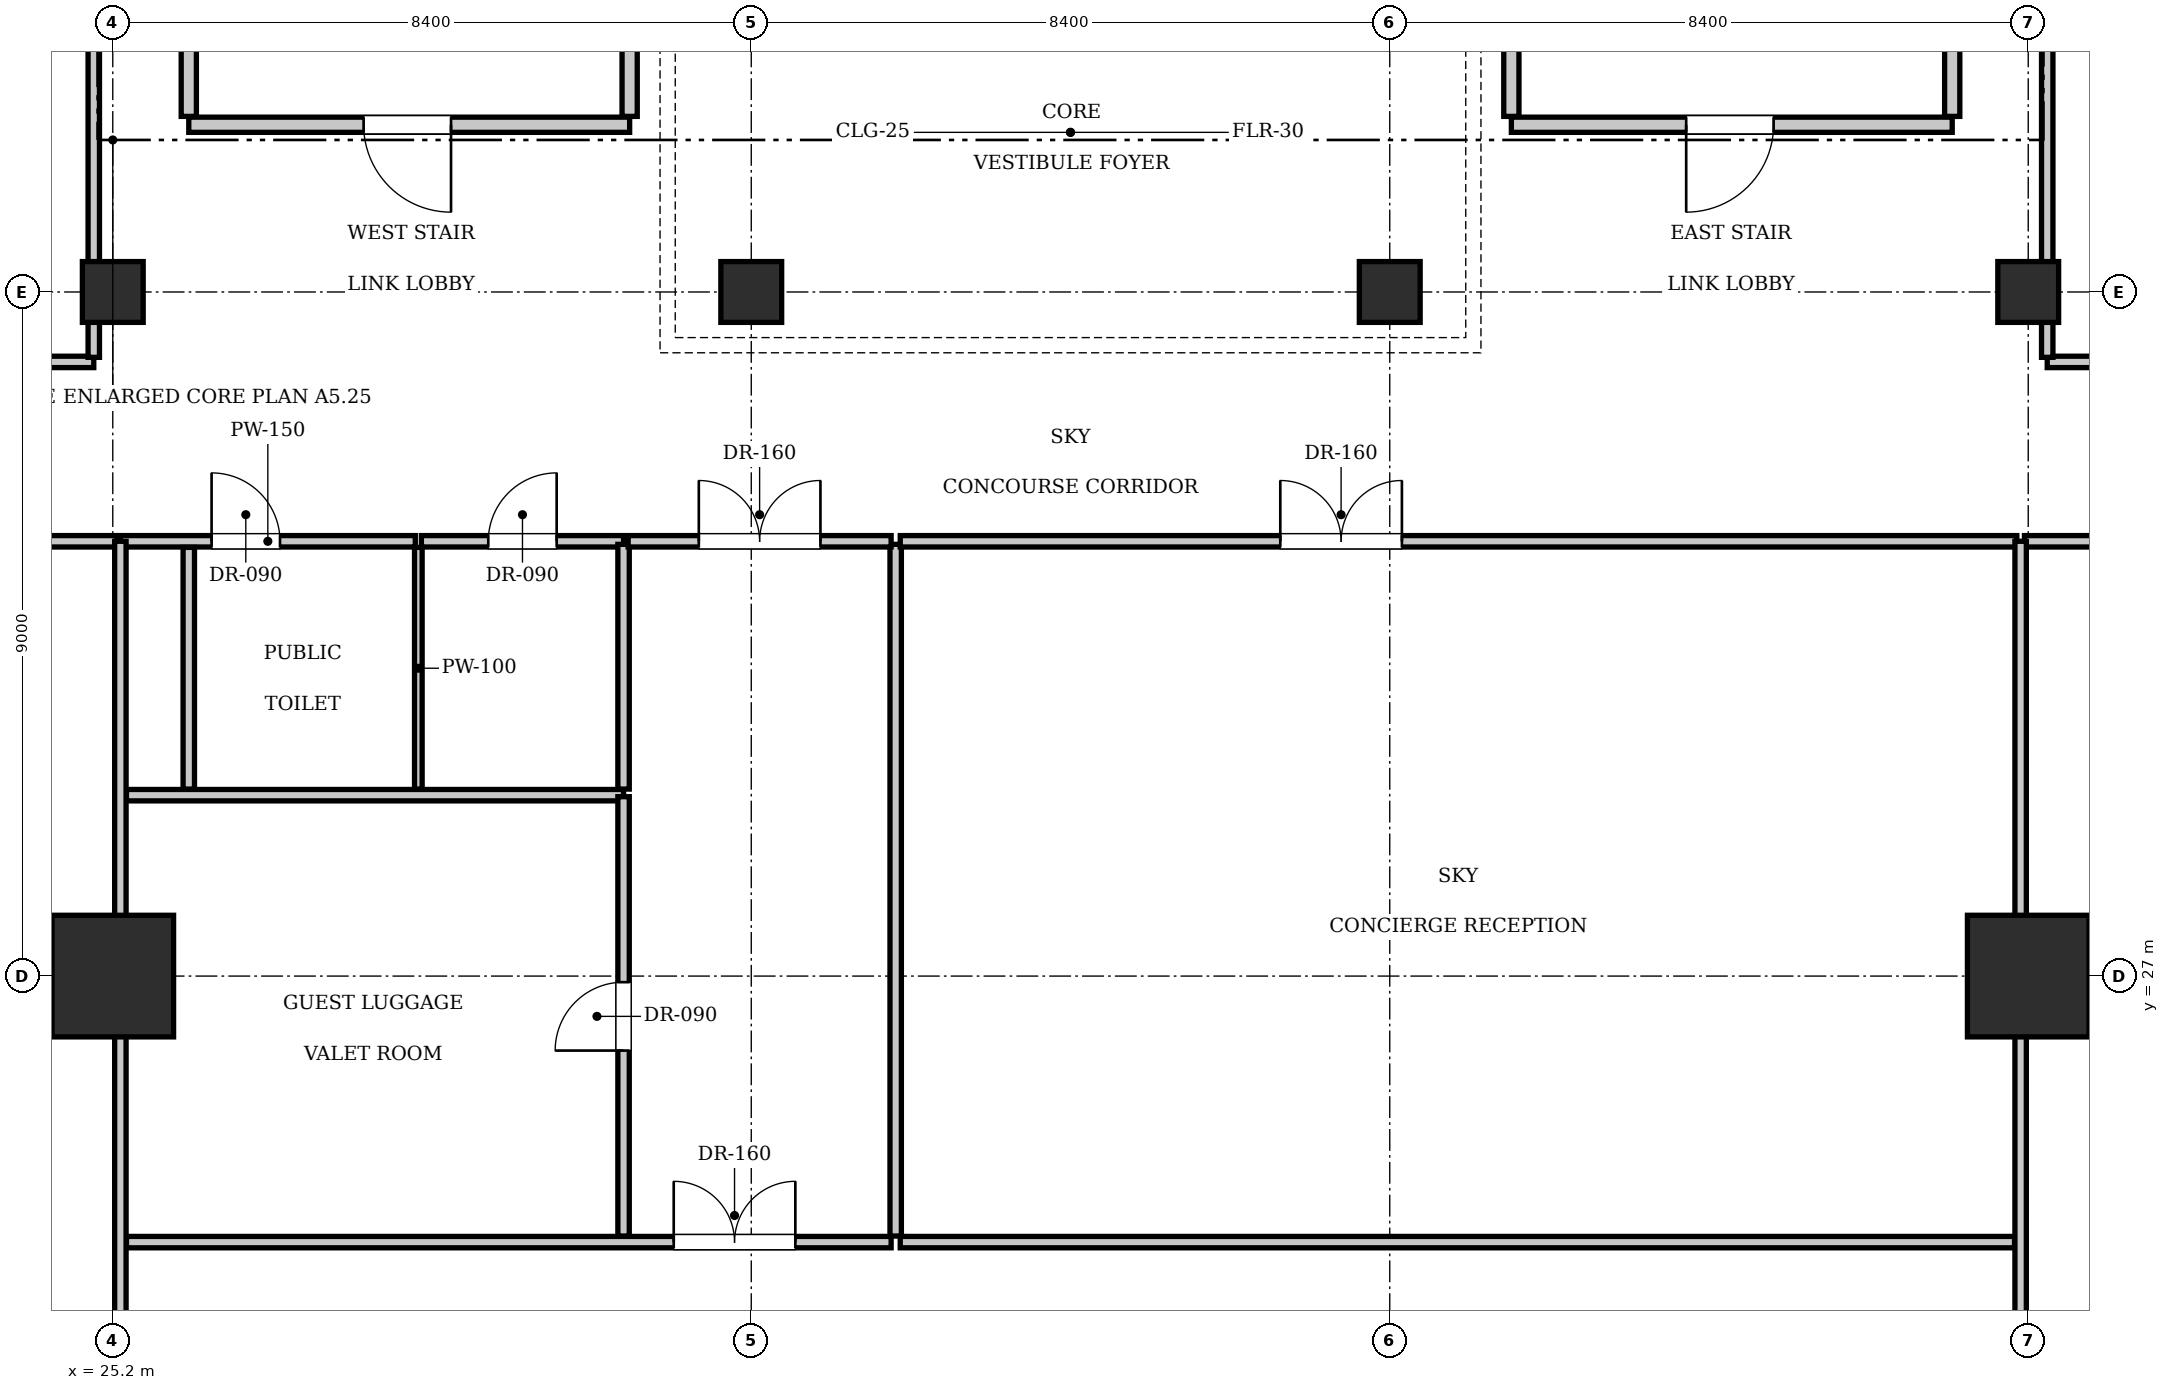
"""IFC4 building model, lengths in metres.
Left out: names, types, materials, properties, quantities, classifications, styles, units other than length and angle.
Written with IfcOpenShell. Run it as: python <this file> out.ifc"""

import sys

from ifc_helpers import new_model, si_unit, direction, frame, frame_2d, origin, origin_2d, place, context, subcontext, project, spatial, rectangle, extrude, element, fill, save


model = new_model("IFC4")
c1 = context("Model", 3, precision=1e-05, world=origin(), true_north=direction((0.0, 1.0)))
c2 = subcontext(c1, "Body", "Model", "MODEL_VIEW")
j1 = project(units=[si_unit("LENGTHUNIT", "METRE"), si_unit("PLANEANGLEUNIT", "RADIAN")], contexts=[c1])
p1 = place(None, origin())
s1 = spatial("IfcSite", under=j1, at=p1, CompositionType="ELEMENT")
p2 = place(p1, origin())
s2 = spatial("IfcBuilding", under=s1, at=p2, CompositionType="ELEMENT")
p3 = place(p2, frame((0.0, 0.0, 234.5)))
s3 = spatial("IfcBuildingStorey", under=s2, at=p3, CompositionType="ELEMENT", Elevation=234.5)
for number, where, z_axis, x_axis in (
    (1, (25.2, 27.0, 0.0), (0.0, 0.0, 1.0), (1.0, 0.0, 0.0)),
    (2, (50.4, 27.0, 0.0), (0.0, 0.0, 1.0), (1.0, 0.0, 0.0)),
):
    element("IfcColumn", number, at=place(p3, frame(where, z_axis=z_axis, x_axis=x_axis)), inside=s3, PredefinedType="COLUMN", context=c2, shape_type="SweptSolid", body=[
        extrude(rectangle(XDim=1.6, YDim=1.6, at=origin_2d()), origin(), (0.0, 0.0, 1.0), 4.9),
    ])
for number, where, z_axis, x_axis in (
    (3, (25.2, 36.0, 0.0), (0.0, 0.0, 1.0), (1.0, 0.0, 0.0)),
    (4, (33.6, 36.0, 0.0), (0.0, 0.0, 1.0), (1.0, 0.0, 0.0)),
    (5, (42.0, 36.0, 0.0), (0.0, 0.0, 1.0), (1.0, 0.0, 0.0)),
    (6, (50.4, 36.0, 0.0), (0.0, 0.0, 1.0), (1.0, 0.0, 0.0)),
):
    element("IfcColumn", number, at=place(p3, frame(where, z_axis=z_axis, x_axis=x_axis)), inside=s3, PredefinedType="COLUMN", context=c2, shape_type="SweptSolid", body=[
        extrude(rectangle(XDim=0.8, YDim=0.8, at=origin_2d()), origin(), (0.0, 0.0, 1.0), 4.9),
    ])
p4 = place(p3, frame((26.2, 38.2, 0.0), z_axis=(0.0, 0.0, 1.0), x_axis=(1.0, 0.0, 0.0)))
e7 = element("IfcWall", 7, at=p4, inside=s3, PredefinedType="PARTITIONING", context=c2, shape_type="SweptSolid", body=[
    extrude(rectangle(XDim=5.8, YDim=0.2, at=frame_2d((2.9, 0.0))), origin(), (0.0, 0.0, 1.0), 4.66),
])
p5 = place(p4, frame((2.3, 0.0, 0.0)))
e8 = element("IfcOpeningElement", 8, at=p5, cuts=e7, PredefinedType="OPENING", context=c2, shape_type="SweptSolid", body=[
    extrude(rectangle(XDim=1.15, YDim=2.15, at=frame_2d((0.575, 1.075))), frame((0.0, 0.11, 0.0), z_axis=(0.0, -1.0, 0.0), x_axis=(1.0, 0.0, 0.0)), (0.0, 0.0, 1.0), 0.22),
])
for number, where, z_axis, x_axis in (
    (9, (26.2, 38.31, 0.0), (0.0, 0.0, 1.0), (0.0, 1.0, 0.0)),
    (10, (32.0, 38.31, 0.0), (0.0, 0.0, 1.0), (0.0, 1.0, 0.0)),
):
    element("IfcWall", number, at=place(p3, frame(where, z_axis=z_axis, x_axis=x_axis)), inside=s3, PredefinedType="PARTITIONING", context=c2, shape_type="SweptSolid", body=[
        extrude(rectangle(XDim=3.07, YDim=0.2, at=frame_2d((1.535, 0.0))), origin(), (0.0, 0.0, 1.0), 4.66),
    ])
p6 = place(p3, frame((43.6, 38.2, 0.0), z_axis=(0.0, 0.0, 1.0), x_axis=(1.0, 0.0, 0.0)))
e11 = element("IfcWall", 11, at=p6, inside=s3, PredefinedType="PARTITIONING", context=c2, shape_type="SweptSolid", body=[
    extrude(rectangle(XDim=5.8, YDim=0.2, at=frame_2d((2.9, 0.0))), origin(), (0.0, 0.0, 1.0), 4.66),
])
p7 = place(p6, frame((2.3, 0.0, 0.0)))
e12 = element("IfcOpeningElement", 12, at=p7, cuts=e11, PredefinedType="OPENING", context=c2, shape_type="SweptSolid", body=[
    extrude(rectangle(XDim=1.15, YDim=2.15, at=frame_2d((0.575, 1.075))), frame((0.0, 0.11, 0.0), z_axis=(0.0, -1.0, 0.0), x_axis=(1.0, 0.0, 0.0)), (0.0, 0.0, 1.0), 0.22),
])
for number, where, z_axis, x_axis in (
    (13, (43.6, 38.31, 0.0), (0.0, 0.0, 1.0), (0.0, 1.0, 0.0)),
    (14, (49.4, 38.31, 0.0), (0.0, 0.0, 1.0), (0.0, 1.0, 0.0)),
):
    element("IfcWall", number, at=place(p3, frame(where, z_axis=z_axis, x_axis=x_axis)), inside=s3, PredefinedType="PARTITIONING", context=c2, shape_type="SweptSolid", body=[
        extrude(rectangle(XDim=3.07, YDim=0.2, at=frame_2d((1.535, 0.0))), origin(), (0.0, 0.0, 1.0), 4.66),
    ])
p8 = place(p3, frame((25.3, 32.72, 0.0), z_axis=(0.0, 0.0, 1.0), x_axis=(1.0, 0.0, 0.0)))
e15 = element("IfcWall", 15, at=p8, inside=s3, PredefinedType="PARTITIONING", context=c2, shape_type="SweptSolid", body=[
    extrude(rectangle(XDim=3.88, YDim=0.15, at=frame_2d((1.94, 0.0))), origin(), (0.0, 0.0, 1.0), 4.66),
])
p9 = place(p8, frame((1.2, 0.0, 0.0)))
e16 = element("IfcOpeningElement", 16, at=p9, cuts=e15, PredefinedType="OPENING", context=c2, shape_type="SweptSolid", body=[
    extrude(rectangle(XDim=0.9, YDim=2.1, at=frame_2d((0.45, 1.05))), frame((0.0, 0.085, 0.0), z_axis=(0.0, -1.0, 0.0), x_axis=(1.0, 0.0, 0.0)), (0.0, 0.0, 1.0), 0.17),
])
p10 = place(p3, frame((29.26, 32.72, 0.0), z_axis=(0.0, 0.0, 1.0), x_axis=(1.0, 0.0, 0.0)))
e17 = element("IfcWall", 17, at=p10, inside=s3, PredefinedType="PARTITIONING", context=c2, shape_type="SweptSolid", body=[
    extrude(rectangle(XDim=2.66, YDim=0.15, at=frame_2d((1.33, 0.0))), origin(), (0.0, 0.0, 1.0), 4.66),
])
p11 = place(p10, frame((0.88, 0.0, 0.0)))
e18 = element("IfcOpeningElement", 18, at=p11, cuts=e17, PredefinedType="OPENING", context=c2, shape_type="SweptSolid", body=[
    extrude(rectangle(XDim=0.9, YDim=2.1, at=frame_2d((0.45, 1.05))), frame((0.0, 0.085, 0.0), z_axis=(0.0, -1.0, 0.0), x_axis=(1.0, 0.0, 0.0)), (0.0, 0.0, 1.0), 0.17),
])
p12 = place(p3, frame((25.38, 29.38, 0.0), z_axis=(0.0, 0.0, 1.0), x_axis=(1.0, 0.0, 0.0)))
e19 = element("IfcWall", 19, at=p12, inside=s3, PredefinedType="PARTITIONING", context=c2, shape_type="SweptSolid", body=[
    extrude(rectangle(XDim=6.54, YDim=0.15, at=frame_2d((3.27, 0.0))), origin(), (0.0, 0.0, 1.0), 4.66),
])
p13 = place(p3, frame((26.2, 29.46, 0.0), z_axis=(0.0, 0.0, 1.0), x_axis=(0.0, 1.0, 0.0)))
e20 = element("IfcWall", 20, at=p13, inside=s3, PredefinedType="PARTITIONING", context=c2, shape_type="SweptSolid", body=[
    extrude(rectangle(XDim=3.18, YDim=0.15, at=frame_2d((1.59, 0.0))), origin(), (0.0, 0.0, 1.0), 4.66),
])
p14 = place(p3, frame((29.22, 29.46, 0.0), z_axis=(0.0, 0.0, 1.0), x_axis=(0.0, 1.0, 0.0)))
e21 = element("IfcWall", 21, at=p14, inside=s3, PredefinedType="PARTITIONING", context=c2, shape_type="SweptSolid", body=[
    extrude(rectangle(XDim=3.18, YDim=0.1, at=frame_2d((1.59, 0.0))), origin(), (0.0, 0.0, 1.0), 4.66),
])
p15 = place(p3, frame((31.92, 29.46, 0.0), z_axis=(0.0, 0.0, 1.0), x_axis=(0.0, 1.0, 0.0)))
e22 = element("IfcWall", 22, at=p15, inside=s3, PredefinedType="PARTITIONING", context=c2, shape_type="SweptSolid", body=[
    extrude(rectangle(XDim=3.22, YDim=0.15, at=frame_2d((1.61, 0.0))), origin(), (0.0, 0.0, 1.0), 4.66),
])
p16 = place(p3, frame((25.38, 23.5, 0.0), z_axis=(0.0, 0.0, 1.0), x_axis=(1.0, 0.0, 0.0)))
e23 = element("IfcWall", 23, at=p16, inside=s3, PredefinedType="PARTITIONING", context=c2, shape_type="SweptSolid", body=[
    extrude(rectangle(XDim=10.06, YDim=0.15, at=frame_2d((5.03, 0.0))), origin(), (0.0, 0.0, 1.0), 4.66),
])
p17 = place(p16, frame((7.2, 0.0, 0.0)))
e24 = element("IfcOpeningElement", 24, at=p17, cuts=e23, PredefinedType="OPENING", context=c2, shape_type="SweptSolid", body=[
    extrude(rectangle(XDim=1.6, YDim=2.3, at=frame_2d((0.8, 1.15))), frame((0.0, 0.085, 0.0), z_axis=(0.0, -1.0, 0.0), x_axis=(1.0, 0.0, 0.0)), (0.0, 0.0, 1.0), 0.17),
])
p18 = place(p3, frame((35.56, 23.5, 0.0), z_axis=(0.0, 0.0, 1.0), x_axis=(1.0, 0.0, 0.0)))
e25 = element("IfcWall", 25, at=p18, inside=s3, PredefinedType="PARTITIONING", context=c2, shape_type="SweptSolid", body=[
    extrude(rectangle(XDim=14.66, YDim=0.15, at=frame_2d((7.33, 0.0))), origin(), (0.0, 0.0, 1.0), 4.66),
])
p19 = place(p3, frame((35.5, 23.58, 0.0), z_axis=(0.0, 0.0, 1.0), x_axis=(0.0, 1.0, 0.0)))
e26 = element("IfcWall", 26, at=p19, inside=s3, PredefinedType="PARTITIONING", context=c2, shape_type="SweptSolid", body=[
    extrude(rectangle(XDim=9.1, YDim=0.15, at=frame_2d((4.55, 0.0))), origin(), (0.0, 0.0, 1.0), 4.66),
])
p20 = place(p3, frame((31.92, 23.58, 0.0), z_axis=(0.0, 0.0, 1.0), x_axis=(0.0, 1.0, 0.0)))
e27 = element("IfcWall", 27, at=p20, inside=s3, PredefinedType="PARTITIONING", context=c2, shape_type="SweptSolid", body=[
    extrude(rectangle(XDim=5.78, YDim=0.15, at=frame_2d((2.89, 0.0))), origin(), (0.0, 0.0, 1.0), 4.66),
])
p21 = place(p20, frame((2.44, 0.0, 0.0)))
e28 = element("IfcOpeningElement", 28, at=p21, cuts=e27, PredefinedType="OPENING", context=c2, shape_type="SweptSolid", body=[
    extrude(rectangle(XDim=0.9, YDim=2.1, at=frame_2d((0.45, 1.05))), frame((0.0, 0.085, 0.0), z_axis=(0.0, -1.0, 0.0), x_axis=(1.0, 0.0, 0.0)), (0.0, 0.0, 1.0), 0.17),
])
p22 = place(p3, frame((31.98, 32.72, 0.0), z_axis=(0.0, 0.0, 1.0), x_axis=(1.0, 0.0, 0.0)))
e29 = element("IfcWall", 29, at=p22, inside=s3, PredefinedType="PARTITIONING", context=c2, shape_type="SweptSolid", body=[
    extrude(rectangle(XDim=3.46, YDim=0.15, at=frame_2d((1.73, 0.0))), origin(), (0.0, 0.0, 1.0), 4.66),
])
p23 = place(p22, frame((0.93, 0.0, 0.0)))
e30 = element("IfcOpeningElement", 30, at=p23, cuts=e29, PredefinedType="OPENING", context=c2, shape_type="SweptSolid", body=[
    extrude(rectangle(XDim=1.6, YDim=2.3, at=frame_2d((0.8, 1.15))), frame((0.0, 0.085, 0.0), z_axis=(0.0, -1.0, 0.0), x_axis=(1.0, 0.0, 0.0)), (0.0, 0.0, 1.0), 0.17),
])
p24 = place(p3, frame((35.56, 32.72, 0.0), z_axis=(0.0, 0.0, 1.0), x_axis=(1.0, 0.0, 0.0)))
e31 = element("IfcWall", 31, at=p24, inside=s3, PredefinedType="PARTITIONING", context=c2, shape_type="SweptSolid", body=[
    extrude(rectangle(XDim=14.69, YDim=0.15, at=frame_2d((7.345, 0.0))), origin(), (0.0, 0.0, 1.0), 4.66),
])
p25 = place(p24, frame((5.0, 0.0, 0.0)))
e32 = element("IfcOpeningElement", 32, at=p25, cuts=e31, PredefinedType="OPENING", context=c2, shape_type="SweptSolid", body=[
    extrude(rectangle(XDim=1.6, YDim=2.3, at=frame_2d((0.8, 1.15))), frame((0.0, 0.085, 0.0), z_axis=(0.0, -1.0, 0.0), x_axis=(1.0, 0.0, 0.0)), (0.0, 0.0, 1.0), 0.17),
])
p26 = place(p3, frame((15.48, 32.72, 0.0), z_axis=(0.0, 0.0, 1.0), x_axis=(1.0, 0.0, 0.0)))
e33 = element("IfcWall", 33, at=p26, inside=s3, PredefinedType="PARTITIONING", context=c2, shape_type="SweptSolid", body=[
    extrude(rectangle(XDim=9.77, YDim=0.15, at=frame_2d((4.885, 0.0))), origin(), (0.0, 0.0, 1.0), 4.66),
])
p27 = place(p26, frame((4.185, 0.0, 0.0)))
e34 = element("IfcOpeningElement", 34, at=p27, cuts=e33, PredefinedType="OPENING", context=c2, shape_type="SweptSolid", body=[
    extrude(rectangle(XDim=1.4, YDim=2.2, at=frame_2d((0.7, 1.1))), frame((0.0, 0.085, 0.0), z_axis=(0.0, -1.0, 0.0), x_axis=(1.0, 0.0, 0.0)), (0.0, 0.0, 1.0), 0.17),
])
p28 = place(p3, frame((50.35, 32.72, 0.0), z_axis=(0.0, 0.0, 1.0), x_axis=(1.0, 0.0, 0.0)))
e35 = element("IfcWall", 35, at=p28, inside=s3, PredefinedType="PARTITIONING", context=c2, shape_type="SweptSolid", body=[
    extrude(rectangle(XDim=9.77, YDim=0.15, at=frame_2d((4.885, 0.0))), origin(), (0.0, 0.0, 1.0), 4.66),
])
p29 = place(p28, frame((4.185, 0.0, 0.0)))
e36 = element("IfcOpeningElement", 36, at=p29, cuts=e35, PredefinedType="OPENING", context=c2, shape_type="SweptSolid", body=[
    extrude(rectangle(XDim=1.4, YDim=2.2, at=frame_2d((0.7, 1.1))), frame((0.0, 0.085, 0.0), z_axis=(0.0, -1.0, 0.0), x_axis=(1.0, 0.0, 0.0)), (0.0, 0.0, 1.0), 0.17),
])
for number, where, z_axis, x_axis in (
    (37, (25.3, 9.28, 0.0), (0.0, 0.0, 1.0), (0.0, 1.0, 0.0)),
    (38, (50.3, 9.28, 0.0), (0.0, 0.0, 1.0), (0.0, 1.0, 0.0)),
):
    element("IfcWall", number, at=place(p3, frame(where, z_axis=z_axis, x_axis=x_axis)), inside=s3, PredefinedType="PARTITIONING", context=c2, shape_type="SweptSolid", body=[
        extrude(rectangle(XDim=23.44, YDim=0.15, at=frame_2d((11.72, 0.0))), origin(), (0.0, 0.0, 1.0), 4.127),
    ])
p30 = place(p3, frame((15.48, 35.08, 0.0), z_axis=(0.0, 0.0, 1.0), x_axis=(1.0, 0.0, 0.0)))
e39 = element("IfcWall", 39, at=p30, inside=s3, PredefinedType="PARTITIONING", context=c2, shape_type="SweptSolid", body=[
    extrude(rectangle(XDim=9.47, YDim=0.15, at=frame_2d((4.735, 0.0))), origin(), (0.0, 0.0, 1.0), 4.66),
])
p31 = place(p30, frame((4.285, 0.0, 0.0)))
e40 = element("IfcOpeningElement", 40, at=p31, cuts=e39, PredefinedType="OPENING", context=c2, shape_type="SweptSolid", body=[
    extrude(rectangle(XDim=0.9, YDim=2.1, at=frame_2d((0.45, 1.05))), frame((0.0, 0.085, 0.0), z_axis=(0.0, -1.0, 0.0), x_axis=(1.0, 0.0, 0.0)), (0.0, 0.0, 1.0), 0.17),
])
p32 = place(p3, frame((24.95, 35.14, 0.0), z_axis=(0.0, 0.0, 1.0), x_axis=(0.0, 1.0, 0.0)))
e41 = element("IfcWall", 41, at=p32, inside=s3, PredefinedType="PARTITIONING", context=c2, shape_type="SweptSolid", body=[
    extrude(rectangle(XDim=18.78, YDim=0.15, at=frame_2d((9.39, 0.0))), origin(), (0.0, 0.0, 1.0), 4.66),
])
p33 = place(p3, frame((50.65, 35.08, 0.0), z_axis=(0.0, 0.0, 1.0), x_axis=(1.0, 0.0, 0.0)))
e42 = element("IfcWall", 42, at=p33, inside=s3, PredefinedType="PARTITIONING", context=c2, shape_type="SweptSolid", body=[
    extrude(rectangle(XDim=9.47, YDim=0.15, at=frame_2d((4.735, 0.0))), origin(), (0.0, 0.0, 1.0), 4.66),
])
p34 = place(p33, frame((4.285, 0.0, 0.0)))
e43 = element("IfcOpeningElement", 43, at=p34, cuts=e42, PredefinedType="OPENING", context=c2, shape_type="SweptSolid", body=[
    extrude(rectangle(XDim=0.9, YDim=2.1, at=frame_2d((0.45, 1.05))), frame((0.0, 0.085, 0.0), z_axis=(0.0, -1.0, 0.0), x_axis=(1.0, 0.0, 0.0)), (0.0, 0.0, 1.0), 0.17),
])
p35 = place(p3, frame((50.65, 35.14, 0.0), z_axis=(0.0, 0.0, 1.0), x_axis=(0.0, 1.0, 0.0)))
e44 = element("IfcWall", 44, at=p35, inside=s3, PredefinedType="PARTITIONING", context=c2, shape_type="SweptSolid", body=[
    extrude(rectangle(XDim=18.78, YDim=0.15, at=frame_2d((9.39, 0.0))), origin(), (0.0, 0.0, 1.0), 4.66),
])
p36 = place(p5, frame((1.15, 0.0, 0.0), z_axis=(0.0, 0.0, 1.0), x_axis=(-1.0, 0.0, 0.0)))
e45 = element("IfcDoor", 45, at=p36, inside=s3, OperationType="SINGLE_SWING_LEFT", PredefinedType="DOOR", context=c2, shape_type="SweptSolid", body=[
    extrude(rectangle(XDim=1.15, YDim=2.15, at=frame_2d((0.575, 1.075))), frame((0.0, 0.025, 0.0), z_axis=(0.0, -1.0, 0.0), x_axis=(1.0, 0.0, 0.0)), (0.0, 0.0, 1.0), 0.05),
])
fill(e8, e45)
p37 = place(p7, frame((1.15, 0.0, 0.0), z_axis=(0.0, 0.0, 1.0), x_axis=(-1.0, 0.0, 0.0)))
e46 = element("IfcDoor", 46, at=p37, inside=s3, OperationType="SINGLE_SWING_RIGHT", PredefinedType="DOOR", context=c2, shape_type="SweptSolid", body=[
    extrude(rectangle(XDim=1.15, YDim=2.15, at=frame_2d((0.575, 1.075))), frame((0.0, 0.025, 0.0), z_axis=(0.0, -1.0, 0.0), x_axis=(1.0, 0.0, 0.0)), (0.0, 0.0, 1.0), 0.05),
])
fill(e12, e46)
p38 = place(p9, origin())
e47 = element("IfcDoor", 47, at=p38, inside=s3, OperationType="SINGLE_SWING_LEFT", PredefinedType="DOOR", context=c2, shape_type="SweptSolid", body=[
    extrude(rectangle(XDim=0.9, YDim=2.1, at=frame_2d((0.45, 1.05))), frame((0.0, 0.025, 0.0), z_axis=(0.0, -1.0, 0.0), x_axis=(1.0, 0.0, 0.0)), (0.0, 0.0, 1.0), 0.05),
])
fill(e16, e47)
p39 = place(p11, origin())
e48 = element("IfcDoor", 48, at=p39, inside=s3, OperationType="SINGLE_SWING_RIGHT", PredefinedType="DOOR", context=c2, shape_type="SweptSolid", body=[
    extrude(rectangle(XDim=0.9, YDim=2.1, at=frame_2d((0.45, 1.05))), frame((0.0, 0.025, 0.0), z_axis=(0.0, -1.0, 0.0), x_axis=(1.0, 0.0, 0.0)), (0.0, 0.0, 1.0), 0.05),
])
fill(e18, e48)
p40 = place(p17, origin())
e49 = element("IfcDoor", 49, at=p40, inside=s3, OperationType="DOUBLE_DOOR_SINGLE_SWING", PredefinedType="DOOR", context=c2, shape_type="SweptSolid", body=[
    extrude(rectangle(XDim=1.6, YDim=2.3, at=frame_2d((0.8, 1.15))), frame((0.0, 0.025, 0.0), z_axis=(0.0, -1.0, 0.0), x_axis=(1.0, 0.0, 0.0)), (0.0, 0.0, 1.0), 0.05),
])
fill(e24, e49)
p41 = place(p23, origin())
e50 = element("IfcDoor", 50, at=p41, inside=s3, OperationType="DOUBLE_DOOR_SINGLE_SWING", PredefinedType="DOOR", context=c2, shape_type="SweptSolid", body=[
    extrude(rectangle(XDim=1.6, YDim=2.3, at=frame_2d((0.8, 1.15))), frame((0.0, 0.025, 0.0), z_axis=(0.0, -1.0, 0.0), x_axis=(1.0, 0.0, 0.0)), (0.0, 0.0, 1.0), 0.05),
])
fill(e30, e50)
p42 = place(p21, origin())
e51 = element("IfcDoor", 51, at=p42, inside=s3, OperationType="SINGLE_SWING_LEFT", PredefinedType="DOOR", context=c2, shape_type="SweptSolid", body=[
    extrude(rectangle(XDim=0.9, YDim=2.1, at=frame_2d((0.45, 1.05))), frame((0.0, 0.025, 0.0), z_axis=(0.0, -1.0, 0.0), x_axis=(1.0, 0.0, 0.0)), (0.0, 0.0, 1.0), 0.05),
])
fill(e28, e51)
p43 = place(p25, origin())
e52 = element("IfcDoor", 52, at=p43, inside=s3, OperationType="DOUBLE_DOOR_SINGLE_SWING", PredefinedType="DOOR", context=c2, shape_type="SweptSolid", body=[
    extrude(rectangle(XDim=1.6, YDim=2.3, at=frame_2d((0.8, 1.15))), frame((0.0, 0.025, 0.0), z_axis=(0.0, -1.0, 0.0), x_axis=(1.0, 0.0, 0.0)), (0.0, 0.0, 1.0), 0.05),
])
fill(e32, e52)
save(model, sys.argv[1])
